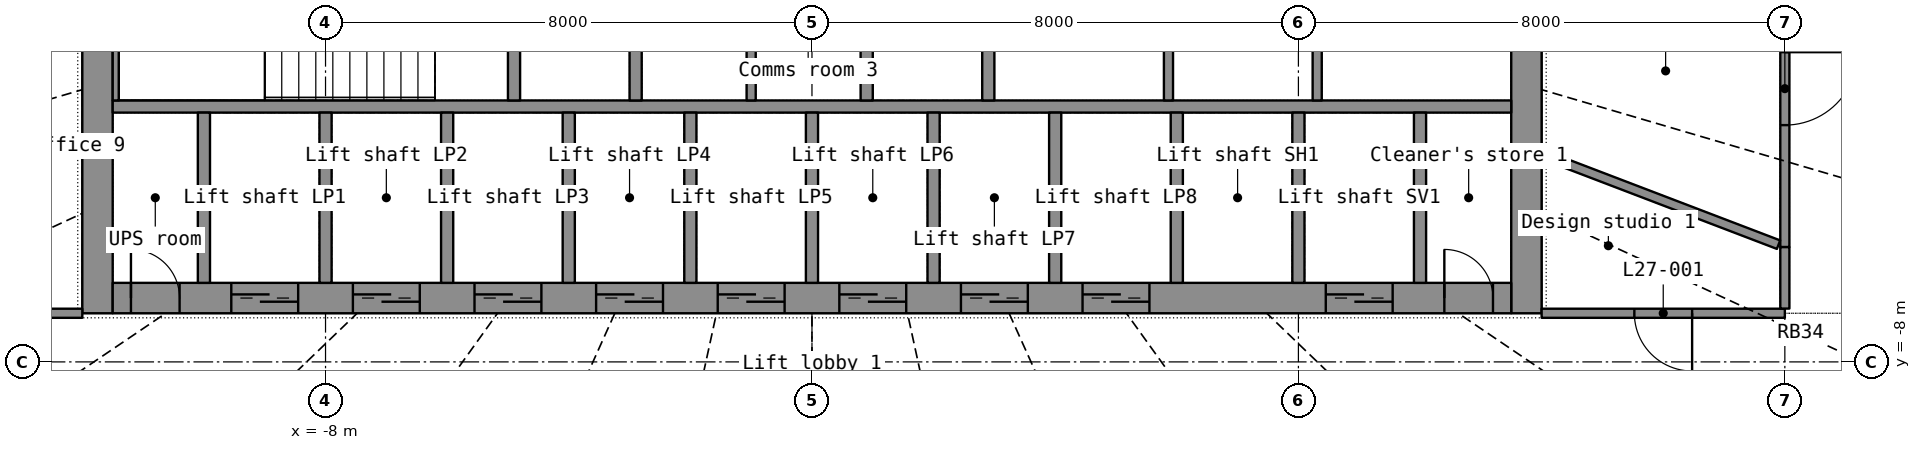
"""IFC4 building model, lengths in metres.
Left out: names, types, materials, properties, quantities, classifications, styles, units other than length and angle.
Written with IfcOpenShell. Run it as: python <this file> out.ifc"""

import sys

from ifc_helpers import new_model, si_unit, direction, frame, frame_2d, origin, place, context, subcontext, project, spatial, rectangle, extrude, element, fill, save


model = new_model("IFC4")
c1 = context("Model", 3, precision=1e-05, world=origin(), true_north=direction((0.0, 1.0)))
c2 = subcontext(c1, "Body", "Model", "MODEL_VIEW")
j1 = project(units=[si_unit("LENGTHUNIT", "METRE"), si_unit("PLANEANGLEUNIT", "RADIAN")], contexts=[c1])
p1 = place(None, origin())
s1 = spatial("IfcSite", under=j1, at=p1, CompositionType="ELEMENT")
p2 = place(p1, origin())
s2 = spatial("IfcBuilding", under=s1, at=p2, CompositionType="ELEMENT")
p3 = place(p2, frame((0.0, 0.0, 115.6)))
s3 = spatial("IfcBuildingStorey", under=s2, at=p3, CompositionType="ELEMENT", Elevation=115.6)
p4 = place(p3, frame((-11.75, -7.2, 0.0), z_axis=(0.0, 0.0, 1.0), x_axis=(0.0, 1.0, 0.0)))
e1 = element("IfcWall", 1, at=p4, inside=s3, PredefinedType="SHEAR", context=c2, shape_type="SweptSolid", body=[
    extrude(rectangle(XDim=14.4, YDim=0.5, at=frame_2d((7.2, 0.0))), origin(), (0.0, 0.0, 1.0), 3.3),
])
p5 = place(p4, frame((6.5, 0.0, 0.0)))
e2 = element("IfcOpeningElement", 2, at=p5, cuts=e1, PredefinedType="OPENING", context=c2, shape_type="SweptSolid", body=[
    extrude(rectangle(XDim=1.4, YDim=2.2, at=frame_2d((0.7, 1.1))), frame((0.0, 0.26, 0.0), z_axis=(0.0, -1.0, 0.0), x_axis=(1.0, 0.0, 0.0)), (0.0, 0.0, 1.0), 0.52),
])
p6 = place(p3, frame((11.75, -7.2, 0.0), z_axis=(0.0, 0.0, 1.0), x_axis=(0.0, 1.0, 0.0)))
e3 = element("IfcWall", 3, at=p6, inside=s3, PredefinedType="SHEAR", context=c2, shape_type="SweptSolid", body=[
    extrude(rectangle(XDim=14.4, YDim=0.5, at=frame_2d((7.2, 0.0))), origin(), (0.0, 0.0, 1.0), 3.3),
])
p7 = place(p6, frame((6.5, 0.0, 0.0)))
e4 = element("IfcOpeningElement", 4, at=p7, cuts=e3, PredefinedType="OPENING", context=c2, shape_type="SweptSolid", body=[
    extrude(rectangle(XDim=1.4, YDim=2.2, at=frame_2d((0.7, 1.1))), frame((0.0, 0.26, 0.0), z_axis=(0.0, -1.0, 0.0), x_axis=(1.0, 0.0, 0.0)), (0.0, 0.0, 1.0), 0.52),
])
p8 = place(p3, frame((-11.5, -6.95, 0.0), z_axis=(0.0, 0.0, 1.0), x_axis=(1.0, 0.0, 0.0)))
e5 = element("IfcWall", 5, at=p8, inside=s3, PredefinedType="SHEAR", context=c2, shape_type="SweptSolid", body=[
    extrude(rectangle(XDim=23.0, YDim=0.5, at=frame_2d((11.5, 0.0))), origin(), (0.0, 0.0, 1.0), 3.3),
])
p9 = place(p8, frame((1.95, 0.0, 0.0)))
e6 = element("IfcOpeningElement", 6, at=p9, cuts=e5, PredefinedType="OPENING", context=c2, shape_type="SweptSolid", body=[
    extrude(rectangle(XDim=1.1, YDim=2.2, at=frame_2d((0.55, 1.1))), frame((0.0, 0.26, 0.0), z_axis=(0.0, -1.0, 0.0), x_axis=(1.0, 0.0, 0.0)), (0.0, 0.0, 1.0), 0.52),
])
p10 = place(p8, frame((3.95, 0.0, 0.0)))
e7 = element("IfcOpeningElement", 7, at=p10, cuts=e5, PredefinedType="OPENING", context=c2, shape_type="SweptSolid", body=[
    extrude(rectangle(XDim=1.1, YDim=2.2, at=frame_2d((0.55, 1.1))), frame((0.0, 0.26, 0.0), z_axis=(0.0, -1.0, 0.0), x_axis=(1.0, 0.0, 0.0)), (0.0, 0.0, 1.0), 0.52),
])
p11 = place(p8, frame((5.95, 0.0, 0.0)))
e8 = element("IfcOpeningElement", 8, at=p11, cuts=e5, PredefinedType="OPENING", context=c2, shape_type="SweptSolid", body=[
    extrude(rectangle(XDim=1.1, YDim=2.2, at=frame_2d((0.55, 1.1))), frame((0.0, 0.26, 0.0), z_axis=(0.0, -1.0, 0.0), x_axis=(1.0, 0.0, 0.0)), (0.0, 0.0, 1.0), 0.52),
])
p12 = place(p8, frame((7.95, 0.0, 0.0)))
e9 = element("IfcOpeningElement", 9, at=p12, cuts=e5, PredefinedType="OPENING", context=c2, shape_type="SweptSolid", body=[
    extrude(rectangle(XDim=1.1, YDim=2.2, at=frame_2d((0.55, 1.1))), frame((0.0, 0.26, 0.0), z_axis=(0.0, -1.0, 0.0), x_axis=(1.0, 0.0, 0.0)), (0.0, 0.0, 1.0), 0.52),
])
p13 = place(p8, frame((9.95, 0.0, 0.0)))
e10 = element("IfcOpeningElement", 10, at=p13, cuts=e5, PredefinedType="OPENING", context=c2, shape_type="SweptSolid", body=[
    extrude(rectangle(XDim=1.1, YDim=2.2, at=frame_2d((0.55, 1.1))), frame((0.0, 0.26, 0.0), z_axis=(0.0, -1.0, 0.0), x_axis=(1.0, 0.0, 0.0)), (0.0, 0.0, 1.0), 0.52),
])
p14 = place(p8, frame((11.95, 0.0, 0.0)))
e11 = element("IfcOpeningElement", 11, at=p14, cuts=e5, PredefinedType="OPENING", context=c2, shape_type="SweptSolid", body=[
    extrude(rectangle(XDim=1.1, YDim=2.2, at=frame_2d((0.55, 1.1))), frame((0.0, 0.26, 0.0), z_axis=(0.0, -1.0, 0.0), x_axis=(1.0, 0.0, 0.0)), (0.0, 0.0, 1.0), 0.52),
])
p15 = place(p8, frame((13.95, 0.0, 0.0)))
e12 = element("IfcOpeningElement", 12, at=p15, cuts=e5, PredefinedType="OPENING", context=c2, shape_type="SweptSolid", body=[
    extrude(rectangle(XDim=1.1, YDim=2.2, at=frame_2d((0.55, 1.1))), frame((0.0, 0.26, 0.0), z_axis=(0.0, -1.0, 0.0), x_axis=(1.0, 0.0, 0.0)), (0.0, 0.0, 1.0), 0.52),
])
p16 = place(p8, frame((15.95, 0.0, 0.0)))
e13 = element("IfcOpeningElement", 13, at=p16, cuts=e5, PredefinedType="OPENING", context=c2, shape_type="SweptSolid", body=[
    extrude(rectangle(XDim=1.1, YDim=2.2, at=frame_2d((0.55, 1.1))), frame((0.0, 0.26, 0.0), z_axis=(0.0, -1.0, 0.0), x_axis=(1.0, 0.0, 0.0)), (0.0, 0.0, 1.0), 0.52),
])
p17 = place(p8, frame((19.95, 0.0, 0.0)))
e14 = element("IfcOpeningElement", 14, at=p17, cuts=e5, PredefinedType="OPENING", context=c2, shape_type="SweptSolid", body=[
    extrude(rectangle(XDim=1.1, YDim=2.2, at=frame_2d((0.55, 1.1))), frame((0.0, 0.26, 0.0), z_axis=(0.0, -1.0, 0.0), x_axis=(1.0, 0.0, 0.0)), (0.0, 0.0, 1.0), 0.52),
])
p18 = place(p8, frame((0.3, 0.0, 0.0)))
e15 = element("IfcOpeningElement", 15, at=p18, cuts=e5, PredefinedType="OPENING", context=c2, shape_type="SweptSolid", body=[
    extrude(rectangle(XDim=0.8, YDim=2.05, at=frame_2d((0.4, 1.025))), frame((0.0, 0.26, 0.0), z_axis=(0.0, -1.0, 0.0), x_axis=(1.0, 0.0, 0.0)), (0.0, 0.0, 1.0), 0.52),
])
p19 = place(p8, frame((21.9, 0.0, 0.0)))
e16 = element("IfcOpeningElement", 16, at=p19, cuts=e5, PredefinedType="OPENING", context=c2, shape_type="SweptSolid", body=[
    extrude(rectangle(XDim=0.8, YDim=2.05, at=frame_2d((0.4, 1.025))), frame((0.0, 0.26, 0.0), z_axis=(0.0, -1.0, 0.0), x_axis=(1.0, 0.0, 0.0)), (0.0, 0.0, 1.0), 0.52),
])
p20 = place(p3, frame((-11.5, -3.8, 0.0), z_axis=(0.0, 0.0, 1.0), x_axis=(1.0, 0.0, 0.0)))
e17 = element("IfcWall", 17, at=p20, inside=s3, PredefinedType="SHEAR", context=c2, shape_type="SweptSolid", body=[
    extrude(rectangle(XDim=23.0, YDim=0.2, at=frame_2d((11.5, 0.0))), origin(), (0.0, 0.0, 1.0), 3.3),
])
for number, where, z_axis, x_axis in (
    (18, (-10.0, -6.7, 0.0), (0.0, 0.0, 1.0), (0.0, 1.0, 0.0)),
    (19, (-8.0, -6.7, 0.0), (0.0, 0.0, 1.0), (0.0, 1.0, 0.0)),
    (20, (-6.0, -6.7, 0.0), (0.0, 0.0, 1.0), (0.0, 1.0, 0.0)),
    (21, (-4.0, -6.7, 0.0), (0.0, 0.0, 1.0), (0.0, 1.0, 0.0)),
    (22, (-2.0, -6.7, 0.0), (0.0, 0.0, 1.0), (0.0, 1.0, 0.0)),
    (23, (0.0, -6.7, 0.0), (0.0, 0.0, 1.0), (0.0, 1.0, 0.0)),
    (24, (2.0, -6.7, 0.0), (0.0, 0.0, 1.0), (0.0, 1.0, 0.0)),
    (25, (4.0, -6.7, 0.0), (0.0, 0.0, 1.0), (0.0, 1.0, 0.0)),
    (26, (6.0, -6.7, 0.0), (0.0, 0.0, 1.0), (0.0, 1.0, 0.0)),
    (27, (8.0, -6.7, 0.0), (0.0, 0.0, 1.0), (0.0, 1.0, 0.0)),
    (28, (10.0, -6.7, 0.0), (0.0, 0.0, 1.0), (0.0, 1.0, 0.0)),
):
    element("IfcWall", number, at=place(p3, frame(where, z_axis=z_axis, x_axis=x_axis)), inside=s3, PredefinedType="SHEAR", context=c2, shape_type="SweptSolid", body=[
        extrude(rectangle(XDim=2.8, YDim=0.2, at=frame_2d((1.4, 0.0))), origin(), (0.0, 0.0, 1.0), 3.3),
    ])
p21 = place(p3, frame((-2.9, -3.7, 0.0), z_axis=(0.0, 0.0, 1.0), x_axis=(0.0, 1.0, 0.0)))
e29 = element("IfcWall", 29, at=p21, inside=s3, PredefinedType="SHEAR", context=c2, shape_type="SweptSolid", body=[
    extrude(rectangle(XDim=7.4, YDim=0.2, at=frame_2d((3.7, 0.0))), origin(), (0.0, 0.0, 1.0), 3.3),
])
p22 = place(p21, frame((3.1, 0.0, 0.0)))
e30 = element("IfcOpeningElement", 30, at=p22, cuts=e29, PredefinedType="OPENING", context=c2, shape_type="SweptSolid", body=[
    extrude(rectangle(XDim=1.2, YDim=2.2, at=frame_2d((0.6, 1.1))), frame((0.0, 0.11, 0.0), z_axis=(0.0, -1.0, 0.0), x_axis=(1.0, 0.0, 0.0)), (0.0, 0.0, 1.0), 0.22),
])
p23 = place(p3, frame((2.9, -3.7, 0.0), z_axis=(0.0, 0.0, 1.0), x_axis=(0.0, 1.0, 0.0)))
e31 = element("IfcWall", 31, at=p23, inside=s3, PredefinedType="SHEAR", context=c2, shape_type="SweptSolid", body=[
    extrude(rectangle(XDim=7.4, YDim=0.2, at=frame_2d((3.7, 0.0))), origin(), (0.0, 0.0, 1.0), 3.3),
])
p24 = place(p23, frame((3.1, 0.0, 0.0)))
e32 = element("IfcOpeningElement", 32, at=p24, cuts=e31, PredefinedType="OPENING", context=c2, shape_type="SweptSolid", body=[
    extrude(rectangle(XDim=1.2, YDim=2.2, at=frame_2d((0.6, 1.1))), frame((0.0, 0.11, 0.0), z_axis=(0.0, -1.0, 0.0), x_axis=(1.0, 0.0, 0.0)), (0.0, 0.0, 1.0), 0.22),
])
p25 = place(p3, frame((0.9, -3.7, 0.0), z_axis=(0.0, 0.0, 1.0), x_axis=(0.0, 1.0, 0.0)))
e33 = element("IfcWall", 33, at=p25, inside=s3, PredefinedType="SHEAR", context=c2, shape_type="SweptSolid", body=[
    extrude(rectangle(XDim=2.35, YDim=0.2, at=frame_2d((1.175, 0.0))), origin(), (0.0, 0.0, 1.0), 3.3),
])
p26 = place(p3, frame((-11.45, -3.7, 0.0), z_axis=(0.0, 0.0, 1.0), x_axis=(0.0, 1.0, 0.0)))
e34 = element("IfcWall", 34, at=p26, inside=s3, PredefinedType="SHEAR", context=c2, shape_type="SweptSolid", body=[
    extrude(rectangle(XDim=2.35, YDim=0.1, at=frame_2d((1.175, 0.0))), origin(), (0.0, 0.0, 1.0), 3.3),
])
p27 = place(p3, frame((-4.9, -3.7, 0.0), z_axis=(0.0, 0.0, 1.0), x_axis=(0.0, 1.0, 0.0)))
e35 = element("IfcWall", 35, at=p27, inside=s3, PredefinedType="SHEAR", context=c2, shape_type="SweptSolid", body=[
    extrude(rectangle(XDim=2.35, YDim=0.2, at=frame_2d((1.175, 0.0))), origin(), (0.0, 0.0, 1.0), 3.3),
])
for number, where, z_axis, x_axis in (
    (36, (5.863, -3.7, 0.0), (0.0, 0.0, 1.0), (0.0, 1.0, 0.0)),
    (37, (8.309, -3.7, 0.0), (0.0, 0.0, 1.0), (0.0, 1.0, 0.0)),
    (38, (-1.0, -3.7, 0.0), (0.0, 0.0, 1.0), (0.0, 1.0, 0.0)),
):
    element("IfcWall", number, at=place(p3, frame(where, z_axis=z_axis, x_axis=x_axis)), inside=s3, PredefinedType="PARTITIONING", context=c2, shape_type="SweptSolid", body=[
        extrude(rectangle(XDim=2.35, YDim=0.15, at=frame_2d((1.175, 0.0))), origin(), (0.0, 0.0, 1.0), 3.3),
    ])
p28 = place(p3, frame((16.0, -0.9, 0.0), z_axis=(0.0, 0.0, 1.0), x_axis=(0.0, -1.0, 0.0)))
e39 = element("IfcWall", 39, at=p28, inside=s3, PredefinedType="PARTITIONING", context=c2, shape_type="SweptSolid", body=[
    extrude(rectangle(XDim=5.211, YDim=0.15, at=frame_2d((2.606, 0.0))), origin(), (0.0, 0.0, 1.0), 2.4),
])
p29 = place(p28, frame((2.006, 0.0, 0.0)))
e40 = element("IfcOpeningElement", 40, at=p29, cuts=e39, PredefinedType="OPENING", context=c2, shape_type="SweptSolid", body=[
    extrude(rectangle(XDim=1.2, YDim=2.2, at=frame_2d((0.6, 1.1))), frame((0.0, 0.085, 0.0), z_axis=(0.0, -1.0, 0.0), x_axis=(1.0, 0.0, 0.0)), (0.0, 0.0, 1.0), 0.17),
])
p30 = place(p3, frame((15.896, -6.072, 0.0), z_axis=(0.0, 0.0, 1.0), x_axis=(-0.934175823, 0.356813021, 0.0)))
e41 = element("IfcWall", 41, at=p30, inside=s3, PredefinedType="PARTITIONING", context=c2, shape_type="SweptSolid", body=[
    extrude(rectangle(XDim=4.171, YDim=0.15, at=frame_2d((2.085, 0.0))), origin(), (0.0, 0.0, 1.0), 2.4),
])
p31 = place(p3, frame((-16.0, -3.512, 0.0), z_axis=(0.0, 0.0, 1.0), x_axis=(0.976750433, 0.214379551, 0.0)))
e42 = element("IfcWall", 42, at=p31, inside=s3, PredefinedType="PARTITIONING", context=c2, shape_type="SweptSolid", body=[
    extrude(rectangle(XDim=4.095, YDim=0.15, at=frame_2d((2.048, 0.0))), origin(), (0.0, 0.0, 1.0), 2.4),
])
p32 = place(p3, frame((-12.0, -7.2, 0.0), z_axis=(0.0, 0.0, 1.0), x_axis=(-1.0, 0.0, 0.0)))
e43 = element("IfcWall", 43, at=p32, inside=s3, PredefinedType="PARTITIONING", context=c2, shape_type="SweptSolid", body=[
    extrude(rectangle(XDim=4.0, YDim=0.15, at=frame_2d((2.0, 0.0))), origin(), (0.0, 0.0, 1.0), 2.4),
])
p33 = place(p32, frame((1.4, 0.0, 0.0)))
e44 = element("IfcOpeningElement", 44, at=p33, cuts=e43, PredefinedType="OPENING", context=c2, shape_type="SweptSolid", body=[
    extrude(rectangle(XDim=1.2, YDim=2.2, at=frame_2d((0.6, 1.1))), frame((0.0, 0.085, 0.0), z_axis=(0.0, -1.0, 0.0), x_axis=(1.0, 0.0, 0.0)), (0.0, 0.0, 1.0), 0.17),
])
p34 = place(p3, frame((16.0, -7.2, 0.0), z_axis=(0.0, 0.0, 1.0), x_axis=(-1.0, 0.0, 0.0)))
e45 = element("IfcWall", 45, at=p34, inside=s3, PredefinedType="PARTITIONING", context=c2, shape_type="SweptSolid", body=[
    extrude(rectangle(XDim=4.0, YDim=0.15, at=frame_2d((2.0, 0.0))), origin(), (0.0, 0.0, 1.0), 2.4),
])
p35 = place(p34, frame((1.525, 0.0, 0.0)))
e46 = element("IfcOpeningElement", 46, at=p35, cuts=e45, PredefinedType="OPENING", context=c2, shape_type="SweptSolid", body=[
    extrude(rectangle(XDim=0.95, YDim=2.15, at=frame_2d((0.475, 1.075))), frame((0.0, 0.085, 0.0), z_axis=(0.0, -1.0, 0.0), x_axis=(1.0, 0.0, 0.0)), (0.0, 0.0, 1.0), 0.17),
])
p36 = place(p3, frame((16.0, -6.112, 0.0), z_axis=(0.0, 0.0, 1.0), x_axis=(0.0, -1.0, 0.0)))
e47 = element("IfcWall", 47, at=p36, inside=s3, PredefinedType="PARTITIONING", context=c2, shape_type="SweptSolid", body=[
    extrude(rectangle(XDim=1.011, YDim=0.15, at=frame_2d((0.505, 0.0))), origin(), (0.0, 0.0, 1.0), 2.4),
])
p37 = place(p9, origin())
e48 = element("IfcDoor", 48, at=p37, inside=s3, OperationType="DOUBLE_DOOR_SLIDING", PredefinedType="DOOR", context=c2, shape_type="SweptSolid", body=[
    extrude(rectangle(XDim=1.1, YDim=2.2, at=frame_2d((0.55, 1.1))), frame((0.0, 0.025, 0.0), z_axis=(0.0, -1.0, 0.0), x_axis=(1.0, 0.0, 0.0)), (0.0, 0.0, 1.0), 0.05),
])
fill(e6, e48)
p38 = place(p10, origin())
e49 = element("IfcDoor", 49, at=p38, inside=s3, OperationType="DOUBLE_DOOR_SLIDING", PredefinedType="DOOR", context=c2, shape_type="SweptSolid", body=[
    extrude(rectangle(XDim=1.1, YDim=2.2, at=frame_2d((0.55, 1.1))), frame((0.0, 0.025, 0.0), z_axis=(0.0, -1.0, 0.0), x_axis=(1.0, 0.0, 0.0)), (0.0, 0.0, 1.0), 0.05),
])
fill(e7, e49)
p39 = place(p11, origin())
e50 = element("IfcDoor", 50, at=p39, inside=s3, OperationType="DOUBLE_DOOR_SLIDING", PredefinedType="DOOR", context=c2, shape_type="SweptSolid", body=[
    extrude(rectangle(XDim=1.1, YDim=2.2, at=frame_2d((0.55, 1.1))), frame((0.0, 0.025, 0.0), z_axis=(0.0, -1.0, 0.0), x_axis=(1.0, 0.0, 0.0)), (0.0, 0.0, 1.0), 0.05),
])
fill(e8, e50)
p40 = place(p12, origin())
e51 = element("IfcDoor", 51, at=p40, inside=s3, OperationType="DOUBLE_DOOR_SLIDING", PredefinedType="DOOR", context=c2, shape_type="SweptSolid", body=[
    extrude(rectangle(XDim=1.1, YDim=2.2, at=frame_2d((0.55, 1.1))), frame((0.0, 0.025, 0.0), z_axis=(0.0, -1.0, 0.0), x_axis=(1.0, 0.0, 0.0)), (0.0, 0.0, 1.0), 0.05),
])
fill(e9, e51)
p41 = place(p13, origin())
e52 = element("IfcDoor", 52, at=p41, inside=s3, OperationType="DOUBLE_DOOR_SLIDING", PredefinedType="DOOR", context=c2, shape_type="SweptSolid", body=[
    extrude(rectangle(XDim=1.1, YDim=2.2, at=frame_2d((0.55, 1.1))), frame((0.0, 0.025, 0.0), z_axis=(0.0, -1.0, 0.0), x_axis=(1.0, 0.0, 0.0)), (0.0, 0.0, 1.0), 0.05),
])
fill(e10, e52)
p42 = place(p14, origin())
e53 = element("IfcDoor", 53, at=p42, inside=s3, OperationType="DOUBLE_DOOR_SLIDING", PredefinedType="DOOR", context=c2, shape_type="SweptSolid", body=[
    extrude(rectangle(XDim=1.1, YDim=2.2, at=frame_2d((0.55, 1.1))), frame((0.0, 0.025, 0.0), z_axis=(0.0, -1.0, 0.0), x_axis=(1.0, 0.0, 0.0)), (0.0, 0.0, 1.0), 0.05),
])
fill(e11, e53)
p43 = place(p15, origin())
e54 = element("IfcDoor", 54, at=p43, inside=s3, OperationType="DOUBLE_DOOR_SLIDING", PredefinedType="DOOR", context=c2, shape_type="SweptSolid", body=[
    extrude(rectangle(XDim=1.1, YDim=2.2, at=frame_2d((0.55, 1.1))), frame((0.0, 0.025, 0.0), z_axis=(0.0, -1.0, 0.0), x_axis=(1.0, 0.0, 0.0)), (0.0, 0.0, 1.0), 0.05),
])
fill(e12, e54)
p44 = place(p16, origin())
e55 = element("IfcDoor", 55, at=p44, inside=s3, OperationType="DOUBLE_DOOR_SLIDING", PredefinedType="DOOR", context=c2, shape_type="SweptSolid", body=[
    extrude(rectangle(XDim=1.1, YDim=2.2, at=frame_2d((0.55, 1.1))), frame((0.0, 0.025, 0.0), z_axis=(0.0, -1.0, 0.0), x_axis=(1.0, 0.0, 0.0)), (0.0, 0.0, 1.0), 0.05),
])
fill(e13, e55)
p45 = place(p17, origin())
e56 = element("IfcDoor", 56, at=p45, inside=s3, OperationType="DOUBLE_DOOR_SLIDING", PredefinedType="DOOR", context=c2, shape_type="SweptSolid", body=[
    extrude(rectangle(XDim=1.1, YDim=2.2, at=frame_2d((0.55, 1.1))), frame((0.0, 0.025, 0.0), z_axis=(0.0, -1.0, 0.0), x_axis=(1.0, 0.0, 0.0)), (0.0, 0.0, 1.0), 0.05),
])
fill(e14, e56)
p46 = place(p18, origin())
e57 = element("IfcDoor", 57, at=p46, inside=s3, OperationType="SINGLE_SWING_LEFT", PredefinedType="DOOR", context=c2, shape_type="SweptSolid", body=[
    extrude(rectangle(XDim=0.8, YDim=2.05, at=frame_2d((0.4, 1.025))), frame((0.0, 0.025, 0.0), z_axis=(0.0, -1.0, 0.0), x_axis=(1.0, 0.0, 0.0)), (0.0, 0.0, 1.0), 0.05),
])
fill(e15, e57)
p47 = place(p19, origin())
e58 = element("IfcDoor", 58, at=p47, inside=s3, OperationType="SINGLE_SWING_LEFT", PredefinedType="DOOR", context=c2, shape_type="SweptSolid", body=[
    extrude(rectangle(XDim=0.8, YDim=2.05, at=frame_2d((0.4, 1.025))), frame((0.0, 0.025, 0.0), z_axis=(0.0, -1.0, 0.0), x_axis=(1.0, 0.0, 0.0)), (0.0, 0.0, 1.0), 0.05),
])
fill(e16, e58)
p48 = place(p35, origin())
e59 = element("IfcDoor", 59, at=p48, inside=s3, OperationType="SINGLE_SWING_LEFT", PredefinedType="DOOR", context=c2, shape_type="SweptSolid", body=[
    extrude(rectangle(XDim=0.95, YDim=2.15, at=frame_2d((0.475, 1.075))), frame((0.0, 0.025, 0.0), z_axis=(0.0, -1.0, 0.0), x_axis=(1.0, 0.0, 0.0)), (0.0, 0.0, 1.0), 0.05),
])
fill(e46, e59)
p49 = place(p29, origin())
e60 = element("IfcDoor", 60, at=p49, inside=s3, OperationType="DOUBLE_DOOR_SINGLE_SWING", PredefinedType="DOOR", context=c2, shape_type="SweptSolid", body=[
    extrude(rectangle(XDim=1.2, YDim=2.2, at=frame_2d((0.6, 1.1))), frame((0.0, 0.025, 0.0), z_axis=(0.0, -1.0, 0.0), x_axis=(1.0, 0.0, 0.0)), (0.0, 0.0, 1.0), 0.05),
])
fill(e40, e60)
save(model, sys.argv[1])
